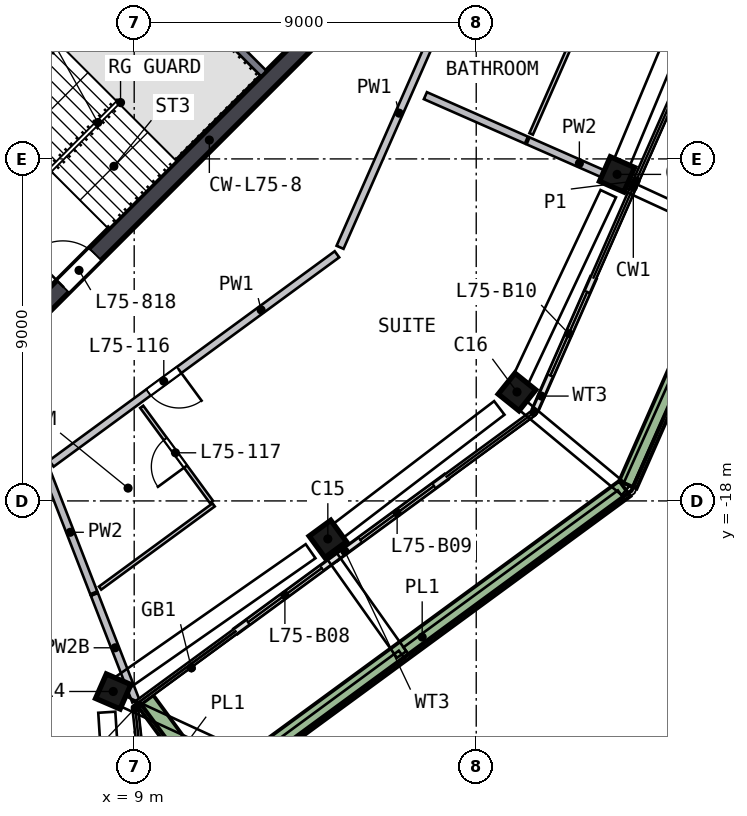
"""IFC4 building model, lengths in metres.
Left out: names, types, materials, properties, quantities, classifications, styles, units other than length and angle.
Written with IfcOpenShell. Run it as: python <this file> out.ifc"""

import sys

from ifc_helpers import new_model, si_unit, direction, frame, frame_2d, origin, origin_2d, place, context, subcontext, project, spatial, rectangle, extrude, element, fill, save


model = new_model("IFC4")
c1 = context("Model", 3, precision=1e-05, world=origin(), true_north=direction((0.0, 1.0)))
c2 = subcontext(c1, "Body", "Model", "MODEL_VIEW")
j1 = project(units=[si_unit("LENGTHUNIT", "METRE"), si_unit("PLANEANGLEUNIT", "RADIAN")], contexts=[c1])
p1 = place(None, origin())
s1 = spatial("IfcSite", under=j1, at=p1, CompositionType="ELEMENT")
p2 = place(p1, origin())
s2 = spatial("IfcBuilding", under=s1, at=p2, CompositionType="ELEMENT")
p3 = place(p2, frame((0.0, 0.0, 303.0)))
s3 = spatial("IfcBuildingStorey", under=s2, at=p3, CompositionType="ELEMENT", Elevation=303.0)
p4 = place(p3, frame((8.316, -23.064, 0.0), z_axis=(0.109306617, 0.040438888, 0.993185159), x_axis=(-0.395433635, -0.914936046, 0.080772964)))
e1 = element("IfcColumn", 1, at=p4, inside=s3, PredefinedType="COLUMN", context=c2, shape_type="SweptSolid", body=[
    extrude(rectangle(XDim=0.7, YDim=0.7, at=origin_2d()), origin(), (0.0, 0.0, 1.0), 3.212),
])
p5 = place(p3, frame((13.986, -19.082, 0.0), z_axis=(0.090193328, 0.067302778, 0.993647573), x_axis=(0.801380305, 0.58747426, -0.112532662)))
e2 = element("IfcColumn", 2, at=p5, inside=s3, PredefinedType="COLUMN", context=c2, shape_type="SweptSolid", body=[
    extrude(rectangle(XDim=0.7, YDim=0.7, at=origin_2d()), origin(), (0.0, 0.0, 1.0), 3.21),
])
p6 = place(p3, frame((18.986, -15.243, 0.0), z_axis=(0.0717623, 0.090919185, 0.993269286), x_axis=(-0.621986949, -0.774414013, 0.115823882)))
e3 = element("IfcColumn", 3, at=p6, inside=s3, PredefinedType="COLUMN", context=c2, shape_type="SweptSolid", body=[
    extrude(rectangle(XDim=0.7, YDim=0.7, at=origin_2d()), origin(), (0.0, 0.0, 1.0), 3.212),
])
p7 = place(p3, frame((21.653, -9.532, 0.0), z_axis=(0.044488369, 0.103349904, 0.993649628), x_axis=(0.400606791, 0.909315502, -0.112514522)))
e4 = element("IfcColumn", 4, at=p7, inside=s3, PredefinedType="COLUMN", context=c2, shape_type="SweptSolid", body=[
    extrude(rectangle(XDim=0.7, YDim=0.7, at=origin_2d()), origin(), (0.0, 0.0, 1.0), 3.21),
])
p8 = place(p3, frame((5.64, -13.841, 0.0), z_axis=(0.0, 0.0, 1.0), x_axis=(0.707106781, 0.707106781, 0.0)))
e5 = element("IfcWall", 5, at=p8, inside=s3, PredefinedType="SHEAR", context=c2, shape_type="SweptSolid", body=[
    extrude(rectangle(XDim=11.598, YDim=0.45, at=frame_2d((5.799, 0.0))), origin(), (0.0, 0.0, 1.0), 3.5),
])
p9 = place(p8, frame((2.099, 0.0, 0.0)))
e6 = element("IfcOpeningElement", 6, at=p9, cuts=e5, PredefinedType="OPENING", context=c2, shape_type="SweptSolid", body=[
    extrude(rectangle(XDim=1.2, YDim=2.1, at=frame_2d((0.6, 1.05))), frame((0.0, 0.235, 0.0), z_axis=(0.0, -1.0, 0.0), x_axis=(1.0, 0.0, 0.0)), (0.0, 0.0, 1.0), 0.47),
])
p10 = place(p3, frame((11.675, -21.426, 0.0), z_axis=(0.0, 0.0, 1.0), x_axis=(0.806576916, 0.591129156, 0.0)))
e7 = element("IfcWall", 7, at=p10, inside=s3, PredefinedType="SOLIDWALL", context=c2, shape_type="SweptSolid", body=[
    extrude(rectangle(XDim=3.25, YDim=0.15, at=frame_2d((1.625, 0.0))), origin(), (0.0, 0.0, 1.0), 2.525),
])
p11 = place(p10, frame((0.4, 0.0, 0.0)))
e8 = element("IfcOpeningElement", 8, at=p11, cuts=e7, PredefinedType="OPENING", context=c2, shape_type="SweptSolid", body=[
    extrude(rectangle(XDim=2.4, YDim=2.4, at=frame_2d((1.2, 1.2))), frame((0.0, 0.085, 0.0), z_axis=(0.0, -1.0, 0.0), x_axis=(1.0, 0.0, 0.0)), (0.0, 0.0, 1.0), 0.17),
])
p12 = place(p3, frame((14.296, -19.505, 0.0), z_axis=(0.0, 0.0, 1.0), x_axis=(0.80652319, 0.591202456, 0.0)))
e9 = element("IfcWall", 9, at=p12, inside=s3, PredefinedType="SOLIDWALL", context=c2, shape_type="SweptSolid", body=[
    extrude(rectangle(XDim=3.611, YDim=0.15, at=frame_2d((1.806, 0.0))), origin(), (0.0, 0.0, 1.0), 2.525),
])
p13 = place(p12, frame((0.811, 0.0, 0.0)))
e10 = element("IfcOpeningElement", 10, at=p13, cuts=e9, PredefinedType="OPENING", context=c2, shape_type="SweptSolid", body=[
    extrude(rectangle(XDim=2.4, YDim=2.4, at=frame_2d((1.2, 1.2))), frame((0.0, 0.085, 0.0), z_axis=(0.0, -1.0, 0.0), x_axis=(1.0, 0.0, 0.0)), (0.0, 0.0, 1.0), 0.17),
])
p14 = place(p3, frame((19.555, -15.601, 0.0), z_axis=(0.0, 0.0, 1.0), x_axis=(0.40288769, 0.915249424, 0.0)))
e11 = element("IfcWall", 11, at=p14, inside=s3, PredefinedType="SOLIDWALL", context=c2, shape_type="SweptSolid", body=[
    extrude(rectangle(XDim=3.787, YDim=0.15, at=frame_2d((1.894, 0.0))), origin(), (0.0, 0.0, 1.0), 2.525),
])
p15 = place(p14, frame((0.987, 0.0, 0.0)))
e12 = element("IfcOpeningElement", 12, at=p15, cuts=e11, PredefinedType="OPENING", context=c2, shape_type="SweptSolid", body=[
    extrude(rectangle(XDim=2.4, YDim=2.4, at=frame_2d((1.2, 1.2))), frame((0.0, 0.085, 0.0), z_axis=(0.0, -1.0, 0.0), x_axis=(1.0, 0.0, 0.0)), (0.0, 0.0, 1.0), 0.17),
])
p16 = place(p3, frame((9.301, -23.261, 0.0), z_axis=(0.0, 0.0, 1.0), x_axis=(0.591171745, -0.806545701, 0.0)))
e13 = element("IfcWall", 13, at=p16, inside=s3, PredefinedType="SOLIDWALL", context=c2, shape_type="SweptSolid", body=[
    extrude(rectangle(XDim=3.199, YDim=0.5, at=frame_2d((1.6, 0.0))), origin(), (0.0, 0.0, 1.0), 0.7),
])
p17 = place(p3, frame((11.245, -25.492, 0.0), z_axis=(0.0, 0.0, 1.0), x_axis=(0.806549363, 0.591166749, 0.0)))
e14 = element("IfcWall", 14, at=p17, inside=s3, PredefinedType="SOLIDWALL", context=c2, shape_type="SweptSolid", body=[
    extrude(rectangle(XDim=13.224, YDim=0.5, at=frame_2d((6.612, 0.0))), origin(), (0.0, 0.0, 1.0), 0.7),
])
p18 = place(p3, frame((21.992, -17.574, 0.0), z_axis=(0.0, 0.0, 1.0), x_axis=(0.402907326, 0.915240781, 0.0)))
e15 = element("IfcWall", 15, at=p18, inside=s3, PredefinedType="SOLIDWALL", context=c2, shape_type="SweptSolid", body=[
    extrude(rectangle(XDim=13.723, YDim=0.5, at=frame_2d((6.862, 0.0))), origin(), (0.0, 0.0, 1.0), 0.7),
])
p19 = place(p3, frame((9.629, -3.24, 0.0), z_axis=(0.0, 0.0, 1.0), x_axis=(-0.707120946, -0.707092617, 0.0)))
e16 = element("IfcWall", 16, at=p19, inside=s3, PredefinedType="SOLIDWALL", context=c2, shape_type="SweptSolid", body=[
    extrude(rectangle(XDim=8.618, YDim=0.2, at=frame_2d((4.309, 0.0))), origin(), (0.0, 0.0, 1.0), 3.19),
])
p20 = place(p19, frame((7.018, 0.0, 0.0)))
e17 = element("IfcOpeningElement", 17, at=p20, cuts=e16, PredefinedType="OPENING", context=c2, shape_type="SweptSolid", body=[
    extrude(rectangle(XDim=1.2, YDim=2.1, at=frame_2d((0.6, 1.05))), frame((0.0, 0.11, 0.0), z_axis=(0.0, -1.0, 0.0), x_axis=(1.0, 0.0, 0.0)), (0.0, 0.0, 1.0), 0.22),
])
p21 = place(p3, frame((9.334, -3.677, 0.0), z_axis=(0.0, 0.0, 1.0), x_axis=(0.707106781, -0.707106781, 0.0)))
e18 = element("IfcWall", 18, at=p21, inside=s3, PredefinedType="SOLIDWALL", context=c2, shape_type="SweptSolid", body=[
    extrude(rectangle(XDim=4.35, YDim=0.2, at=frame_2d((2.175, 0.0))), origin(), (0.0, 0.0, 1.0), 3.19),
])
p22 = place(p3, frame((14.336, -11.51, 0.0), z_axis=(0.0, 0.0, 1.0), x_axis=(-0.806552438, -0.591162553, 0.0)))
e19 = element("IfcWall", 19, at=p22, inside=s3, PredefinedType="SOLIDWALL", context=c2, shape_type="SweptSolid", body=[
    extrude(rectangle(XDim=9.316, YDim=0.2, at=frame_2d((4.658, 0.0))), origin(), (0.0, 0.0, 1.0), 3.19),
])
p23 = place(p22, frame((5.15, 0.0, 0.0)))
e20 = element("IfcOpeningElement", 20, at=p23, cuts=e19, PredefinedType="OPENING", context=c2, shape_type="SweptSolid", body=[
    extrude(rectangle(XDim=1.0, YDim=2.1, at=frame_2d((0.5, 1.05))), frame((0.0, 0.11, 0.0), z_axis=(0.0, -1.0, 0.0), x_axis=(1.0, 0.0, 0.0)), (0.0, 0.0, 1.0), 0.22),
])
p24 = place(p3, frame((18.09, -2.983, 0.0), z_axis=(0.0, 0.0, 1.0), x_axis=(-0.402915421, -0.915237217, 0.0)))
e21 = element("IfcWall", 21, at=p24, inside=s3, PredefinedType="SOLIDWALL", context=c2, shape_type="SweptSolid", body=[
    extrude(rectangle(XDim=9.116, YDim=0.2, at=frame_2d((4.558, 0.0))), origin(), (0.0, 0.0, 1.0), 3.19),
])
p25 = place(p24, frame((0.2, 0.0, 0.0)))
e22 = element("IfcOpeningElement", 22, at=p25, cuts=e21, PredefinedType="OPENING", context=c2, shape_type="SweptSolid", body=[
    extrude(rectangle(XDim=1.0, YDim=2.1, at=frame_2d((0.5, 1.05))), frame((0.0, 0.11, 0.0), z_axis=(0.0, -1.0, 0.0), x_axis=(1.0, 0.0, 0.0)), (0.0, 0.0, 1.0), 0.22),
])
p26 = place(p3, frame((6.698, -17.232, 0.0), z_axis=(0.0, 0.0, 1.0), x_axis=(0.362236017, -0.932086406, 0.0)))
e23 = element("IfcWall", 23, at=p26, inside=s3, PredefinedType="SOLIDWALL", context=c2, shape_type="SweptSolid", body=[
    extrude(rectangle(XDim=3.418, YDim=0.2, at=frame_2d((1.709, 0.0))), origin(), (0.0, 0.0, 1.0), 3.19),
])
p27 = place(p3, frame((7.953, -20.461, 0.0), z_axis=(0.0, 0.0, 1.0), x_axis=(0.362301505, -0.932060953, 0.0)))
e24 = element("IfcWall", 24, at=p27, inside=s3, PredefinedType="SOLIDWALL", context=c2, shape_type="SweptSolid", body=[
    extrude(rectangle(XDim=3.011, YDim=0.2, at=frame_2d((1.506, 0.0))), origin(), (0.0, 0.0, 1.0), 2.69),
])
p28 = place(p3, frame((16.663, -7.335, 0.0), z_axis=(0.0, 0.0, 1.0), x_axis=(0.915227017, -0.402938591, 0.0)))
e25 = element("IfcWall", 25, at=p28, inside=s3, PredefinedType="SOLIDWALL", context=c2, shape_type="SweptSolid", body=[
    extrude(rectangle(XDim=2.905, YDim=0.2, at=frame_2d((1.452, 0.0))), origin(), (0.0, 0.0, 1.0), 3.19),
])
p29 = place(p3, frame((19.363, -8.524, 0.0), z_axis=(0.0, 0.0, 1.0), x_axis=(0.915238191, -0.402913208, 0.0)))
e26 = element("IfcWall", 26, at=p29, inside=s3, PredefinedType="SOLIDWALL", context=c2, shape_type="SweptSolid", body=[
    extrude(rectangle(XDim=2.952, YDim=0.2, at=frame_2d((1.476, 0.0))), origin(), (0.0, 0.0, 1.0), 3.19),
])
p30 = place(p3, frame((11.09, -18.105, 0.0), z_axis=(0.0, 0.0, 1.0), x_axis=(-0.806587268, -0.59111503, 0.0)))
e27 = element("IfcWall", 27, at=p30, inside=s3, PredefinedType="PARTITIONING", context=c2, shape_type="SweptSolid", body=[
    extrude(rectangle(XDim=3.704, YDim=0.1, at=frame_2d((1.852, 0.0))), origin(), (0.0, 0.0, 1.0), 3.19),
])
p31 = place(p3, frame((11.031, -18.024, 0.0), z_axis=(0.0, 0.0, 1.0), x_axis=(-0.5912066, 0.806520153, 0.0)))
e28 = element("IfcWall", 28, at=p31, inside=s3, PredefinedType="PARTITIONING", context=c2, shape_type="SweptSolid", body=[
    extrude(rectangle(XDim=3.1, YDim=0.1, at=frame_2d((1.55, 0.0))), origin(), (0.0, 0.0, 1.0), 3.19),
])
p32 = place(p31, frame((1.15, 0.0, 0.0)))
e29 = element("IfcOpeningElement", 29, at=p32, cuts=e28, PredefinedType="OPENING", context=c2, shape_type="SweptSolid", body=[
    extrude(rectangle(XDim=0.9, YDim=2.1, at=frame_2d((0.45, 1.05))), frame((0.0, 0.06, 0.0), z_axis=(0.0, -1.0, 0.0), x_axis=(1.0, 0.0, 0.0)), (0.0, 0.0, 1.0), 0.12),
])
p33 = place(p3, frame((20.533, -5.871, 0.0), z_axis=(0.0, 0.0, 1.0), x_axis=(-0.402914357, -0.915237685, 0.0)))
e30 = element("IfcWall", 30, at=p33, inside=s3, PredefinedType="PARTITIONING", context=c2, shape_type="SweptSolid", body=[
    extrude(rectangle(XDim=2.7, YDim=0.1, at=frame_2d((1.35, 0.0))), origin(), (0.0, 0.0, 1.0), 3.19),
])
p34 = place(p11, origin())
e31 = element("IfcDoor", 31, at=p34, inside=s3, OperationType="SLIDING_TO_RIGHT", PredefinedType="DOOR", context=c2, shape_type="SweptSolid", body=[
    extrude(rectangle(XDim=2.4, YDim=2.4, at=frame_2d((1.2, 1.2))), frame((0.0, 0.025, 0.0), z_axis=(0.0, -1.0, 0.0), x_axis=(1.0, 0.0, 0.0)), (0.0, 0.0, 1.0), 0.05),
])
fill(e8, e31)
p35 = place(p13, origin())
e32 = element("IfcDoor", 32, at=p35, inside=s3, OperationType="SLIDING_TO_LEFT", PredefinedType="DOOR", context=c2, shape_type="SweptSolid", body=[
    extrude(rectangle(XDim=2.4, YDim=2.4, at=frame_2d((1.2, 1.2))), frame((0.0, 0.025, 0.0), z_axis=(0.0, -1.0, 0.0), x_axis=(1.0, 0.0, 0.0)), (0.0, 0.0, 1.0), 0.05),
])
fill(e10, e32)
p36 = place(p15, origin())
e33 = element("IfcDoor", 33, at=p36, inside=s3, OperationType="SLIDING_TO_LEFT", PredefinedType="DOOR", context=c2, shape_type="SweptSolid", body=[
    extrude(rectangle(XDim=2.4, YDim=2.4, at=frame_2d((1.2, 1.2))), frame((0.0, 0.025, 0.0), z_axis=(0.0, -1.0, 0.0), x_axis=(1.0, 0.0, 0.0)), (0.0, 0.0, 1.0), 0.05),
])
fill(e12, e33)
p37 = place(p9, origin())
e34 = element("IfcDoor", 34, at=p37, inside=s3, OperationType="SINGLE_SWING_LEFT", PredefinedType="DOOR", context=c2, shape_type="SweptSolid", body=[
    extrude(rectangle(XDim=1.2, YDim=2.1, at=frame_2d((0.6, 1.05))), frame((0.0, 0.025, 0.0), z_axis=(0.0, -1.0, 0.0), x_axis=(1.0, 0.0, 0.0)), (0.0, 0.0, 1.0), 0.05),
])
fill(e6, e34)
p38 = place(p23, origin())
e35 = element("IfcDoor", 35, at=p38, inside=s3, OperationType="SINGLE_SWING_LEFT", PredefinedType="DOOR", context=c2, shape_type="SweptSolid", body=[
    extrude(rectangle(XDim=1.0, YDim=2.1, at=frame_2d((0.5, 1.05))), frame((0.0, 0.025, 0.0), z_axis=(0.0, -1.0, 0.0), x_axis=(1.0, 0.0, 0.0)), (0.0, 0.0, 1.0), 0.05),
])
fill(e20, e35)
p39 = place(p32, origin())
e36 = element("IfcDoor", 36, at=p39, inside=s3, OperationType="SINGLE_SWING_LEFT", PredefinedType="DOOR", context=c2, shape_type="SweptSolid", body=[
    extrude(rectangle(XDim=0.9, YDim=2.1, at=frame_2d((0.45, 1.05))), frame((0.0, 0.025, 0.0), z_axis=(0.0, -1.0, 0.0), x_axis=(1.0, 0.0, 0.0)), (0.0, 0.0, 1.0), 0.05),
])
fill(e29, e36)
save(model, sys.argv[1])
